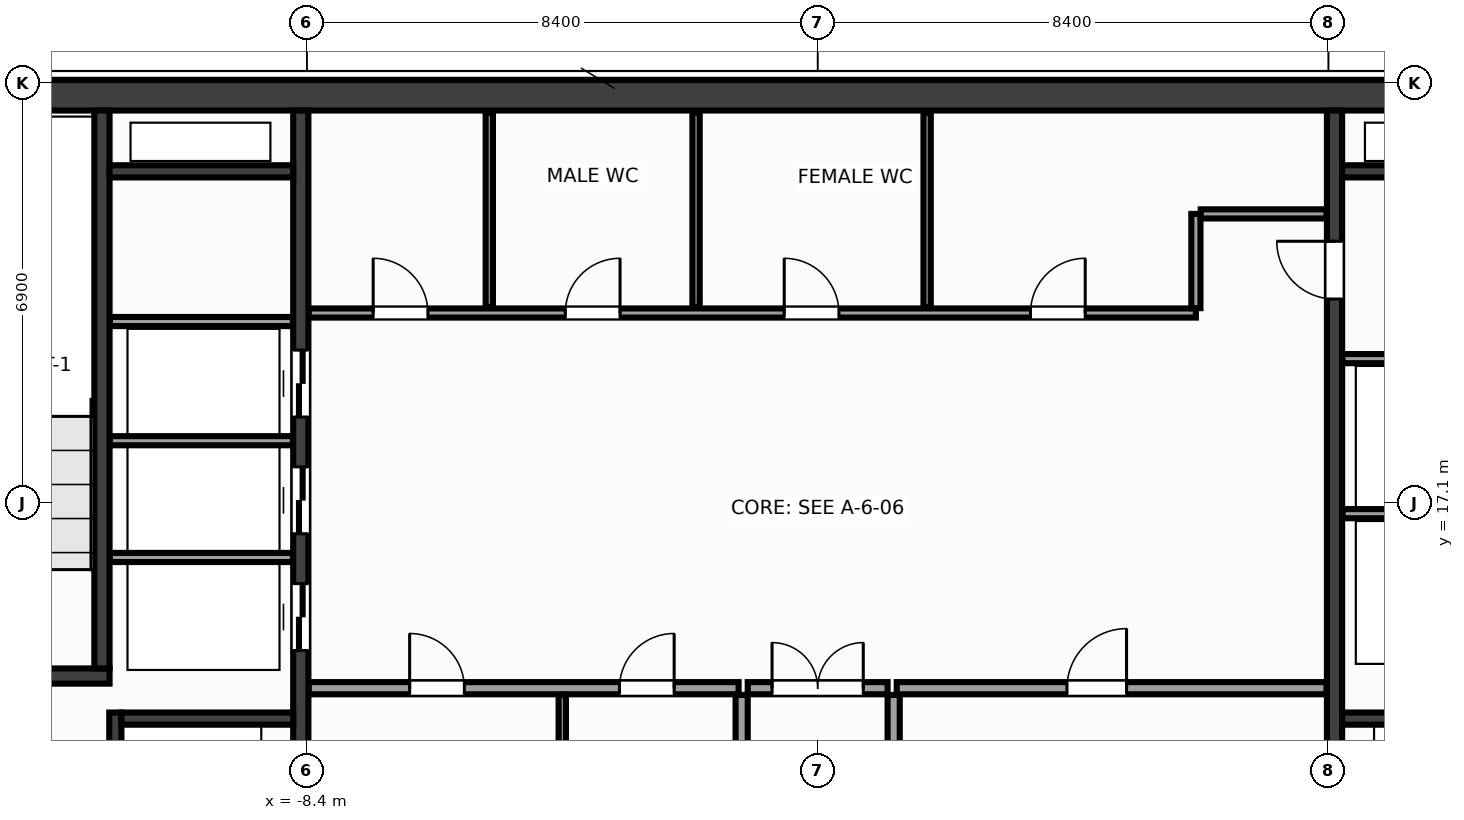
"""IFC4 building model, lengths in metres.
Left out: names, types, materials, properties, quantities, classifications, styles, units other than length and angle.
Written with IfcOpenShell. Run it as: python <this file> out.ifc"""

import sys

from ifc_helpers import new_model, si_unit, direction, frame, frame_2d, origin, place, context, subcontext, project, spatial, rectangle, extrude, source, transform, mapped, element, fill, save


model = new_model("IFC4")
c1 = context("Model", 3, precision=1e-05, world=origin(), true_north=direction((0.0, 1.0)))
c2 = subcontext(c1, "Body", "Model", "MODEL_VIEW")
j1 = project(units=[si_unit("LENGTHUNIT", "METRE"), si_unit("PLANEANGLEUNIT", "RADIAN")], contexts=[c1])
p1 = place(None, origin())
s1 = spatial("IfcSite", under=j1, at=p1, CompositionType="ELEMENT")
p2 = place(p1, origin())
s2 = spatial("IfcBuilding", under=s1, at=p2, CompositionType="ELEMENT")
p3 = place(p2, frame((0.0, 0.0, 272.0)))
s3 = spatial("IfcBuildingStorey", under=s2, at=p3, CompositionType="ELEMENT", Elevation=272.0)
m1 = source(origin(), c2, "Body", "SweptSolid", [
    extrude(rectangle(XDim=31.7, YDim=0.5, at=frame_2d((15.85, 0.0))), origin(), (0.0, 0.0, 1.0), 3.6),
])
p4 = place(p3, frame((-15.85, 23.8, 0.0), z_axis=(0.0, 0.0, 1.0), x_axis=(1.0, 0.0, 0.0)))
e1 = element("IfcWall", 1, at=p4, inside=s3, PredefinedType="SHEAR", context=c2, shape_type="MappedRepresentation", body=[
    mapped(m1, transform((0.0, 0.0, 0.0), x_axis=(1.0, 0.0, 0.0), y_axis=(0.0, 1.0, 0.0), z_axis=(0.0, 0.0, 1.0), scale=1.0)),
])
m2 = source(origin(), c2, "Body", "SweptSolid", [
    extrude(rectangle(XDim=13.1, YDim=0.25, at=frame_2d((6.55, 0.0))), origin(), (0.0, 0.0, 1.0), 3.6),
])
p5 = place(p3, frame((-8.5, 10.45, 0.0), z_axis=(0.0, 0.0, 1.0), x_axis=(0.0, 1.0, 0.0)))
e2 = element("IfcWall", 2, at=p5, inside=s3, PredefinedType="SHEAR", context=c2, shape_type="MappedRepresentation", body=[
    mapped(m2, transform((0.0, 0.0, 0.0), x_axis=(1.0, 0.0, 0.0), y_axis=(0.0, 1.0, 0.0), z_axis=(0.0, 0.0, 1.0), scale=1.0)),
])
p6 = place(p5, frame((4.22, 0.0, 0.0)))
e3 = element("IfcOpeningElement", 3, at=p6, cuts=e2, PredefinedType="OPENING", context=c2, shape_type="SweptSolid", body=[
    extrude(rectangle(XDim=1.1, YDim=2.15, at=frame_2d((0.55, 1.075))), frame((0.0, 0.137, 0.0), z_axis=(0.0, -1.0, 0.0), x_axis=(1.0, 0.0, 0.0)), (0.0, 0.0, 1.0), 0.274),
])
p7 = place(p5, frame((6.14, 0.0, 0.0)))
e4 = element("IfcOpeningElement", 4, at=p7, cuts=e2, PredefinedType="OPENING", context=c2, shape_type="SweptSolid", body=[
    extrude(rectangle(XDim=1.1, YDim=2.15, at=frame_2d((0.55, 1.075))), frame((0.0, 0.137, 0.0), z_axis=(0.0, -1.0, 0.0), x_axis=(1.0, 0.0, 0.0)), (0.0, 0.0, 1.0), 0.274),
])
p8 = place(p5, frame((8.06, 0.0, 0.0)))
e5 = element("IfcOpeningElement", 5, at=p8, cuts=e2, PredefinedType="OPENING", context=c2, shape_type="SweptSolid", body=[
    extrude(rectangle(XDim=1.1, YDim=2.15, at=frame_2d((0.55, 1.075))), frame((0.0, 0.137, 0.0), z_axis=(0.0, -1.0, 0.0), x_axis=(1.0, 0.0, 0.0)), (0.0, 0.0, 1.0), 0.274),
])
p9 = place(p3, frame((8.5, 10.45, 0.0), z_axis=(0.0, 0.0, 1.0), x_axis=(0.0, 1.0, 0.0)))
e6 = element("IfcWall", 6, at=p9, inside=s3, PredefinedType="SHEAR", context=c2, shape_type="MappedRepresentation", body=[
    mapped(m2, transform((0.0, 0.0, 0.0), x_axis=(1.0, 0.0, 0.0), y_axis=(0.0, 1.0, 0.0), z_axis=(0.0, 0.0, 1.0), scale=1.0)),
])
p10 = place(p9, frame((10.0, 0.0, 0.0)))
e7 = element("IfcOpeningElement", 7, at=p10, cuts=e6, PredefinedType="OPENING", context=c2, shape_type="SweptSolid", body=[
    extrude(rectangle(XDim=0.95, YDim=2.15, at=frame_2d((0.475, 1.075))), frame((0.0, 0.137, 0.0), z_axis=(0.0, -1.0, 0.0), x_axis=(1.0, 0.0, 0.0)), (0.0, 0.0, 1.0), 0.274),
])
m3 = source(origin(), c2, "Body", "SweptSolid", [
    extrude(rectangle(XDim=3.705, YDim=0.25, at=frame_2d((1.853, 0.0))), origin(), (0.0, 0.0, 1.0), 3.6),
])
p11 = place(p3, frame((-15.35, 14.25, 0.0), z_axis=(0.0, 0.0, 1.0), x_axis=(1.0, 0.0, 0.0)))
e8 = element("IfcWall", 8, at=p11, inside=s3, PredefinedType="SHEAR", context=c2, shape_type="MappedRepresentation", body=[
    mapped(m3, transform((0.0, 0.0, 0.0), x_axis=(1.0, 0.0, 0.0), y_axis=(0.0, 1.0, 0.0), z_axis=(0.0, 0.0, 1.0), scale=1.0)),
])
p12 = place(p11, frame((0.95, 0.0, 0.0)))
e9 = element("IfcOpeningElement", 9, at=p12, cuts=e8, PredefinedType="OPENING", context=c2, shape_type="SweptSolid", body=[
    extrude(rectangle(XDim=1.6, YDim=2.15, at=frame_2d((0.8, 1.075))), frame((0.0, 0.137, 0.0), z_axis=(0.0, -1.0, 0.0), x_axis=(1.0, 0.0, 0.0)), (0.0, 0.0, 1.0), 0.274),
])
m4 = source(origin(), c2, "Body", "SweptSolid", [
    extrude(rectangle(XDim=9.175, YDim=0.25, at=frame_2d((4.587, 0.0))), origin(), (0.0, 0.0, 1.0), 3.6),
])
p13 = place(p3, frame((-11.77, 14.375, 0.0), z_axis=(0.0, 0.0, 1.0), x_axis=(0.0, 1.0, 0.0)))
e10 = element("IfcWall", 10, at=p13, inside=s3, PredefinedType="SHEAR", context=c2, shape_type="MappedRepresentation", body=[
    mapped(m4, transform((0.0, 0.0, 0.0), x_axis=(1.0, 0.0, 0.0), y_axis=(0.0, 1.0, 0.0), z_axis=(0.0, 0.0, 1.0), scale=1.0)),
])
m5 = source(origin(), c2, "Body", "SweptSolid", [
    extrude(rectangle(XDim=3.2, YDim=0.2, at=frame_2d((1.6, 0.0))), origin(), (0.0, 0.0, 1.0), 3.6),
])
p14 = place(p3, frame((-11.55, 10.45, 0.0), z_axis=(0.0, 0.0, 1.0), x_axis=(0.0, 1.0, 0.0)))
e11 = element("IfcWall", 11, at=p14, inside=s3, PredefinedType="SHEAR", context=c2, shape_type="MappedRepresentation", body=[
    mapped(m5, transform((0.0, 0.0, 0.0), x_axis=(1.0, 0.0, 0.0), y_axis=(0.0, 1.0, 0.0), z_axis=(0.0, 0.0, 1.0), scale=1.0)),
])
p15 = place(p14, frame((0.9, 0.0, 0.0)))
e12 = element("IfcOpeningElement", 12, at=p15, cuts=e11, PredefinedType="OPENING", context=c2, shape_type="SweptSolid", body=[
    extrude(rectangle(XDim=1.1, YDim=2.15, at=frame_2d((0.55, 1.075))), frame((0.0, 0.112, 0.0), z_axis=(0.0, -1.0, 0.0), x_axis=(1.0, 0.0, 0.0)), (0.0, 0.0, 1.0), 0.224),
])
m6 = source(origin(), c2, "Body", "SweptSolid", [
    extrude(rectangle(XDim=2.825, YDim=0.2, at=frame_2d((1.413, 0.0))), origin(), (0.0, 0.0, 1.0), 3.6),
])
for number, where, z_axis, x_axis in (
    (13, (-11.45, 13.55, 0.0), (0.0, 0.0, 1.0), (1.0, 0.0, 0.0)),
    (14, (8.625, 13.55, 0.0), (0.0, 0.0, 1.0), (1.0, 0.0, 0.0)),
):
    element("IfcWall", number, at=place(p3, frame(where, z_axis=z_axis, x_axis=x_axis)), inside=s3, PredefinedType="SHEAR", context=c2, shape_type="MappedRepresentation", body=[
        mapped(m6, transform((0.0, 0.0, 0.0), x_axis=(1.0, 0.0, 0.0), y_axis=(0.0, 1.0, 0.0), z_axis=(0.0, 0.0, 1.0), scale=1.0)),
    ])
m7 = source(origin(), c2, "Body", "SweptSolid", [
    extrude(rectangle(XDim=3.02, YDim=0.2, at=frame_2d((1.51, 0.0))), origin(), (0.0, 0.0, 1.0), 3.6),
])
for number, where, z_axis, x_axis in (
    (15, (-11.645, 22.55, 0.0), (0.0, 0.0, 1.0), (1.0, 0.0, 0.0)),
    (16, (8.625, 22.55, 0.0), (0.0, 0.0, 1.0), (1.0, 0.0, 0.0)),
):
    element("IfcWall", number, at=place(p3, frame(where, z_axis=z_axis, x_axis=x_axis)), inside=s3, PredefinedType="SHEAR", context=c2, shape_type="MappedRepresentation", body=[
        mapped(m7, transform((0.0, 0.0, 0.0), x_axis=(1.0, 0.0, 0.0), y_axis=(0.0, 1.0, 0.0), z_axis=(0.0, 0.0, 1.0), scale=1.0)),
    ])
m8 = source(origin(), c2, "Body", "SweptSolid", [
    extrude(rectangle(XDim=3.01, YDim=0.15, at=frame_2d((1.505, 0.0))), origin(), (0.0, 0.0, 1.0), 3.37),
])
for number, where, z_axis, x_axis in (
    (17, (-11.64, 16.2, 0.0), (0.0, 0.0, 1.0), (1.0, 0.0, 0.0)),
    (18, (-11.64, 18.12, 0.0), (0.0, 0.0, 1.0), (1.0, 0.0, 0.0)),
    (19, (-11.64, 20.08, 0.0), (0.0, 0.0, 1.0), (1.0, 0.0, 0.0)),
    (20, (8.63, 16.92, 0.0), (0.0, 0.0, 1.0), (1.0, 0.0, 0.0)),
    (21, (8.63, 19.47, 0.0), (0.0, 0.0, 1.0), (1.0, 0.0, 0.0)),
):
    element("IfcWall", number, at=place(p3, frame(where, z_axis=z_axis, x_axis=x_axis)), inside=s3, PredefinedType="PARTITIONING", context=c2, shape_type="MappedRepresentation", body=[
        mapped(m8, transform((0.0, 0.0, 0.0), x_axis=(1.0, 0.0, 0.0), y_axis=(0.0, 1.0, 0.0), z_axis=(0.0, 0.0, 1.0), scale=1.0)),
    ])
m9 = source(origin(), c2, "Body", "SweptSolid", [
    extrude(rectangle(XDim=7.07, YDim=0.2, at=frame_2d((3.535, 0.0))), origin(), (0.0, 0.0, 1.0), 3.37),
])
p16 = place(p3, frame((-8.37, 14.05, 0.0), z_axis=(0.0, 0.0, 1.0), x_axis=(1.0, 0.0, 0.0)))
e22 = element("IfcWall", 22, at=p16, inside=s3, PredefinedType="PARTITIONING", context=c2, shape_type="MappedRepresentation", body=[
    mapped(m9, transform((0.0, 0.0, 0.0), x_axis=(1.0, 0.0, 0.0), y_axis=(0.0, 1.0, 0.0), z_axis=(0.0, 0.0, 1.0), scale=1.0)),
])
p17 = place(p16, frame((1.66, 0.0, 0.0)))
e23 = element("IfcOpeningElement", 23, at=p17, cuts=e22, PredefinedType="OPENING", context=c2, shape_type="SweptSolid", body=[
    extrude(rectangle(XDim=0.9, YDim=2.15, at=frame_2d((0.45, 1.075))), frame((0.0, 0.112, 0.0), z_axis=(0.0, -1.0, 0.0), x_axis=(1.0, 0.0, 0.0)), (0.0, 0.0, 1.0), 0.224),
])
p18 = place(p16, frame((5.11, 0.0, 0.0)))
e24 = element("IfcOpeningElement", 24, at=p18, cuts=e22, PredefinedType="OPENING", context=c2, shape_type="SweptSolid", body=[
    extrude(rectangle(XDim=0.9, YDim=2.15, at=frame_2d((0.45, 1.075))), frame((0.0, 0.112, 0.0), z_axis=(0.0, -1.0, 0.0), x_axis=(1.0, 0.0, 0.0)), (0.0, 0.0, 1.0), 0.224),
])
p19 = place(p3, frame((1.3, 14.05, 0.0), z_axis=(0.0, 0.0, 1.0), x_axis=(1.0, 0.0, 0.0)))
e25 = element("IfcWall", 25, at=p19, inside=s3, PredefinedType="PARTITIONING", context=c2, shape_type="MappedRepresentation", body=[
    mapped(m9, transform((0.0, 0.0, 0.0), x_axis=(1.0, 0.0, 0.0), y_axis=(0.0, 1.0, 0.0), z_axis=(0.0, 0.0, 1.0), scale=1.0)),
])
p20 = place(p19, frame((2.8, 0.0, 0.0)))
e26 = element("IfcOpeningElement", 26, at=p20, cuts=e25, PredefinedType="OPENING", context=c2, shape_type="SweptSolid", body=[
    extrude(rectangle(XDim=0.98, YDim=2.15, at=frame_2d((0.49, 1.075))), frame((0.0, 0.112, 0.0), z_axis=(0.0, -1.0, 0.0), x_axis=(1.0, 0.0, 0.0)), (0.0, 0.0, 1.0), 0.224),
])
m10 = source(origin(), c2, "Body", "SweptSolid", [
    extrude(rectangle(XDim=3.49, YDim=0.2, at=frame_2d((1.745, 0.0))), origin(), (0.0, 0.0, 1.0), 3.37),
])
for number, where, z_axis, x_axis in (
    (27, (-1.25, 10.45, 0.0), (0.0, 0.0, 1.0), (0.0, 1.0, 0.0)),
    (28, (1.25, 10.45, 0.0), (0.0, 0.0, 1.0), (0.0, 1.0, 0.0)),
):
    element("IfcWall", number, at=place(p3, frame(where, z_axis=z_axis, x_axis=x_axis)), inside=s3, PredefinedType="PARTITIONING", context=c2, shape_type="MappedRepresentation", body=[
        mapped(m10, transform((0.0, 0.0, 0.0), x_axis=(1.0, 0.0, 0.0), y_axis=(0.0, 1.0, 0.0), z_axis=(0.0, 0.0, 1.0), scale=1.0)),
    ])
m11 = source(origin(), c2, "Body", "SweptSolid", [
    extrude(rectangle(XDim=2.3, YDim=0.2, at=frame_2d((1.15, 0.0))), origin(), (0.0, 0.0, 1.0), 3.37),
])
p21 = place(p3, frame((-1.15, 14.05, 0.0), z_axis=(0.0, 0.0, 1.0), x_axis=(1.0, 0.0, 0.0)))
e29 = element("IfcWall", 29, at=p21, inside=s3, PredefinedType="PARTITIONING", context=c2, shape_type="MappedRepresentation", body=[
    mapped(m11, transform((0.0, 0.0, 0.0), x_axis=(1.0, 0.0, 0.0), y_axis=(0.0, 1.0, 0.0), z_axis=(0.0, 0.0, 1.0), scale=1.0)),
])
p22 = place(p21, frame((0.4, 0.0, 0.0)))
e30 = element("IfcOpeningElement", 30, at=p22, cuts=e29, PredefinedType="OPENING", context=c2, shape_type="SweptSolid", body=[
    extrude(rectangle(XDim=1.5, YDim=2.2, at=frame_2d((0.75, 1.1))), frame((0.0, 0.112, 0.0), z_axis=(0.0, -1.0, 0.0), x_axis=(1.0, 0.0, 0.0)), (0.0, 0.0, 1.0), 0.224),
])
m12 = source(origin(), c2, "Body", "SweptSolid", [
    extrude(rectangle(XDim=14.59, YDim=0.15, at=frame_2d((7.295, 0.0))), origin(), (0.0, 0.0, 1.0), 3.37),
])
p23 = place(p3, frame((-8.37, 20.22, 0.0), z_axis=(0.0, 0.0, 1.0), x_axis=(1.0, 0.0, 0.0)))
e31 = element("IfcWall", 31, at=p23, inside=s3, PredefinedType="PARTITIONING", context=c2, shape_type="MappedRepresentation", body=[
    mapped(m12, transform((0.0, 0.0, 0.0), x_axis=(1.0, 0.0, 0.0), y_axis=(0.0, 1.0, 0.0), z_axis=(0.0, 0.0, 1.0), scale=1.0)),
])
p24 = place(p23, frame((1.06, 0.0, 0.0)))
e32 = element("IfcOpeningElement", 32, at=p24, cuts=e31, PredefinedType="OPENING", context=c2, shape_type="SweptSolid", body=[
    extrude(rectangle(XDim=0.9, YDim=2.15, at=frame_2d((0.45, 1.075))), frame((0.0, 0.087, 0.0), z_axis=(0.0, -1.0, 0.0), x_axis=(1.0, 0.0, 0.0)), (0.0, 0.0, 1.0), 0.174),
])
p25 = place(p23, frame((4.22, 0.0, 0.0)))
e33 = element("IfcOpeningElement", 33, at=p25, cuts=e31, PredefinedType="OPENING", context=c2, shape_type="SweptSolid", body=[
    extrude(rectangle(XDim=0.9, YDim=2.15, at=frame_2d((0.45, 1.075))), frame((0.0, 0.087, 0.0), z_axis=(0.0, -1.0, 0.0), x_axis=(1.0, 0.0, 0.0)), (0.0, 0.0, 1.0), 0.174),
])
p26 = place(p23, frame((7.82, 0.0, 0.0)))
e34 = element("IfcOpeningElement", 34, at=p26, cuts=e31, PredefinedType="OPENING", context=c2, shape_type="SweptSolid", body=[
    extrude(rectangle(XDim=0.9, YDim=2.15, at=frame_2d((0.45, 1.075))), frame((0.0, 0.087, 0.0), z_axis=(0.0, -1.0, 0.0), x_axis=(1.0, 0.0, 0.0)), (0.0, 0.0, 1.0), 0.174),
])
p27 = place(p23, frame((11.87, 0.0, 0.0)))
e35 = element("IfcOpeningElement", 35, at=p27, cuts=e31, PredefinedType="OPENING", context=c2, shape_type="SweptSolid", body=[
    extrude(rectangle(XDim=0.9, YDim=2.15, at=frame_2d((0.45, 1.075))), frame((0.0, 0.087, 0.0), z_axis=(0.0, -1.0, 0.0), x_axis=(1.0, 0.0, 0.0)), (0.0, 0.0, 1.0), 0.174),
])
m13 = source(origin(), c2, "Body", "SweptSolid", [
    extrude(rectangle(XDim=1.55, YDim=0.15, at=frame_2d((0.775, 0.0))), origin(), (0.0, 0.0, 1.0), 3.37),
])
p28 = place(p3, frame((6.22, 20.3, 0.0), z_axis=(0.0, 0.0, 1.0), x_axis=(0.0, 1.0, 0.0)))
e36 = element("IfcWall", 36, at=p28, inside=s3, PredefinedType="PARTITIONING", context=c2, shape_type="MappedRepresentation", body=[
    mapped(m13, transform((0.0, 0.0, 0.0), x_axis=(1.0, 0.0, 0.0), y_axis=(0.0, 1.0, 0.0), z_axis=(0.0, 0.0, 1.0), scale=1.0)),
])
m14 = source(origin(), c2, "Body", "SweptSolid", [
    extrude(rectangle(XDim=2.07, YDim=0.15, at=frame_2d((1.035, 0.0))), origin(), (0.0, 0.0, 1.0), 3.37),
])
p29 = place(p3, frame((6.3, 21.85, 0.0), z_axis=(0.0, 0.0, 1.0), x_axis=(1.0, 0.0, 0.0)))
e37 = element("IfcWall", 37, at=p29, inside=s3, PredefinedType="PARTITIONING", context=c2, shape_type="MappedRepresentation", body=[
    mapped(m14, transform((0.0, 0.0, 0.0), x_axis=(1.0, 0.0, 0.0), y_axis=(0.0, 1.0, 0.0), z_axis=(0.0, 0.0, 1.0), scale=1.0)),
])
m15 = source(origin(), c2, "Body", "SweptSolid", [
    extrude(rectangle(XDim=3.49, YDim=0.12, at=frame_2d((1.745, 0.0))), origin(), (0.0, 0.0, 1.0), 3.37),
])
p30 = place(p3, frame((-4.2, 10.45, 0.0), z_axis=(0.0, 0.0, 1.0), x_axis=(0.0, 1.0, 0.0)))
e38 = element("IfcWall", 38, at=p30, inside=s3, PredefinedType="PARTITIONING", context=c2, shape_type="MappedRepresentation", body=[
    mapped(m15, transform((0.0, 0.0, 0.0), x_axis=(1.0, 0.0, 0.0), y_axis=(0.0, 1.0, 0.0), z_axis=(0.0, 0.0, 1.0), scale=1.0)),
])
m16 = source(origin(), c2, "Body", "SweptSolid", [
    extrude(rectangle(XDim=3.19, YDim=0.12, at=frame_2d((1.595, 0.0))), origin(), (0.0, 0.0, 1.0), 3.37),
])
for number, where, z_axis, x_axis in (
    (39, (-5.4, 20.32, 0.0), (0.0, 0.0, 1.0), (0.0, 1.0, 0.0)),
    (40, (-2.0, 20.32, 0.0), (0.0, 0.0, 1.0), (0.0, 1.0, 0.0)),
    (41, (1.8, 20.32, 0.0), (0.0, 0.0, 1.0), (0.0, 1.0, 0.0)),
):
    element("IfcWall", number, at=place(p3, frame(where, z_axis=z_axis, x_axis=x_axis)), inside=s3, PredefinedType="PARTITIONING", context=c2, shape_type="MappedRepresentation", body=[
        mapped(m16, transform((0.0, 0.0, 0.0), x_axis=(1.0, 0.0, 0.0), y_axis=(0.0, 1.0, 0.0), z_axis=(0.0, 0.0, 1.0), scale=1.0)),
    ])
m17 = source(origin(), c2, "Body", "SweptSolid", [
    extrude(rectangle(XDim=1.1, YDim=2.15, at=frame_2d((0.55, 1.075))), frame((0.0, 0.025, 0.0), z_axis=(0.0, -1.0, 0.0), x_axis=(1.0, 0.0, 0.0)), (0.0, 0.0, 1.0), 0.05),
])
p31 = place(p6, origin())
e42 = element("IfcDoor", 42, at=p31, inside=s3, OperationType="DOUBLE_DOOR_SLIDING", PredefinedType="DOOR", context=c2, shape_type="MappedRepresentation", body=[
    mapped(m17, transform((0.0, 0.0, 0.0), x_axis=(1.0, 0.0, 0.0), y_axis=(0.0, 1.0, 0.0), z_axis=(0.0, 0.0, 1.0), scale=1.0)),
])
fill(e3, e42)
p32 = place(p7, origin())
e43 = element("IfcDoor", 43, at=p32, inside=s3, OperationType="DOUBLE_DOOR_SLIDING", PredefinedType="DOOR", context=c2, shape_type="MappedRepresentation", body=[
    mapped(m17, transform((0.0, 0.0, 0.0), x_axis=(1.0, 0.0, 0.0), y_axis=(0.0, 1.0, 0.0), z_axis=(0.0, 0.0, 1.0), scale=1.0)),
])
fill(e4, e43)
p33 = place(p8, origin())
e44 = element("IfcDoor", 44, at=p33, inside=s3, OperationType="DOUBLE_DOOR_SLIDING", PredefinedType="DOOR", context=c2, shape_type="MappedRepresentation", body=[
    mapped(m17, transform((0.0, 0.0, 0.0), x_axis=(1.0, 0.0, 0.0), y_axis=(0.0, 1.0, 0.0), z_axis=(0.0, 0.0, 1.0), scale=1.0)),
])
fill(e5, e44)
m18 = source(origin(), c2, "Body", "SweptSolid", [
    extrude(rectangle(XDim=0.95, YDim=2.15, at=frame_2d((0.475, 1.075))), frame((0.0, 0.025, 0.0), z_axis=(0.0, -1.0, 0.0), x_axis=(1.0, 0.0, 0.0)), (0.0, 0.0, 1.0), 0.05),
])
p34 = place(p10, origin())
e45 = element("IfcDoor", 45, at=p34, inside=s3, OperationType="SINGLE_SWING_RIGHT", PredefinedType="DOOR", context=c2, shape_type="MappedRepresentation", body=[
    mapped(m18, transform((0.0, 0.0, 0.0), x_axis=(1.0, 0.0, 0.0), y_axis=(0.0, 1.0, 0.0), z_axis=(0.0, 0.0, 1.0), scale=1.0)),
])
fill(e7, e45)
m19 = source(origin(), c2, "Body", "SweptSolid", [
    extrude(rectangle(XDim=0.9, YDim=2.15, at=frame_2d((0.45, 1.075))), frame((0.0, 0.025, 0.0), z_axis=(0.0, -1.0, 0.0), x_axis=(1.0, 0.0, 0.0)), (0.0, 0.0, 1.0), 0.05),
])
p35 = place(p17, origin())
e46 = element("IfcDoor", 46, at=p35, inside=s3, OperationType="SINGLE_SWING_LEFT", PredefinedType="DOOR", context=c2, shape_type="MappedRepresentation", body=[
    mapped(m19, transform((0.0, 0.0, 0.0), x_axis=(1.0, 0.0, 0.0), y_axis=(0.0, 1.0, 0.0), z_axis=(0.0, 0.0, 1.0), scale=1.0)),
])
fill(e23, e46)
p36 = place(p18, origin())
e47 = element("IfcDoor", 47, at=p36, inside=s3, OperationType="SINGLE_SWING_RIGHT", PredefinedType="DOOR", context=c2, shape_type="MappedRepresentation", body=[
    mapped(m19, transform((0.0, 0.0, 0.0), x_axis=(1.0, 0.0, 0.0), y_axis=(0.0, 1.0, 0.0), z_axis=(0.0, 0.0, 1.0), scale=1.0)),
])
fill(e24, e47)
m20 = source(origin(), c2, "Body", "SweptSolid", [
    extrude(rectangle(XDim=0.98, YDim=2.15, at=frame_2d((0.49, 1.075))), frame((0.0, 0.025, 0.0), z_axis=(0.0, -1.0, 0.0), x_axis=(1.0, 0.0, 0.0)), (0.0, 0.0, 1.0), 0.05),
])
p37 = place(p20, origin())
e48 = element("IfcDoor", 48, at=p37, inside=s3, OperationType="SINGLE_SWING_RIGHT", PredefinedType="DOOR", context=c2, shape_type="MappedRepresentation", body=[
    mapped(m20, transform((0.0, 0.0, 0.0), x_axis=(1.0, 0.0, 0.0), y_axis=(0.0, 1.0, 0.0), z_axis=(0.0, 0.0, 1.0), scale=1.0)),
])
fill(e26, e48)
m21 = source(origin(), c2, "Body", "SweptSolid", [
    extrude(rectangle(XDim=1.5, YDim=2.2, at=frame_2d((0.75, 1.1))), frame((0.0, 0.025, 0.0), z_axis=(0.0, -1.0, 0.0), x_axis=(1.0, 0.0, 0.0)), (0.0, 0.0, 1.0), 0.05),
])
p38 = place(p22, origin())
e49 = element("IfcDoor", 49, at=p38, inside=s3, OperationType="DOUBLE_DOOR_SINGLE_SWING", PredefinedType="DOOR", context=c2, shape_type="MappedRepresentation", body=[
    mapped(m21, transform((0.0, 0.0, 0.0), x_axis=(1.0, 0.0, 0.0), y_axis=(0.0, 1.0, 0.0), z_axis=(0.0, 0.0, 1.0), scale=1.0)),
])
fill(e30, e49)
p39 = place(p24, origin())
e50 = element("IfcDoor", 50, at=p39, inside=s3, OperationType="SINGLE_SWING_LEFT", PredefinedType="DOOR", context=c2, shape_type="MappedRepresentation", body=[
    mapped(m19, transform((0.0, 0.0, 0.0), x_axis=(1.0, 0.0, 0.0), y_axis=(0.0, 1.0, 0.0), z_axis=(0.0, 0.0, 1.0), scale=1.0)),
])
fill(e32, e50)
p40 = place(p25, origin())
e51 = element("IfcDoor", 51, at=p40, inside=s3, OperationType="SINGLE_SWING_RIGHT", PredefinedType="DOOR", context=c2, shape_type="MappedRepresentation", body=[
    mapped(m19, transform((0.0, 0.0, 0.0), x_axis=(1.0, 0.0, 0.0), y_axis=(0.0, 1.0, 0.0), z_axis=(0.0, 0.0, 1.0), scale=1.0)),
])
fill(e33, e51)
p41 = place(p26, origin())
e52 = element("IfcDoor", 52, at=p41, inside=s3, OperationType="SINGLE_SWING_LEFT", PredefinedType="DOOR", context=c2, shape_type="MappedRepresentation", body=[
    mapped(m19, transform((0.0, 0.0, 0.0), x_axis=(1.0, 0.0, 0.0), y_axis=(0.0, 1.0, 0.0), z_axis=(0.0, 0.0, 1.0), scale=1.0)),
])
fill(e34, e52)
p42 = place(p27, origin())
e53 = element("IfcDoor", 53, at=p42, inside=s3, OperationType="SINGLE_SWING_RIGHT", PredefinedType="DOOR", context=c2, shape_type="MappedRepresentation", body=[
    mapped(m19, transform((0.0, 0.0, 0.0), x_axis=(1.0, 0.0, 0.0), y_axis=(0.0, 1.0, 0.0), z_axis=(0.0, 0.0, 1.0), scale=1.0)),
])
fill(e35, e53)
save(model, sys.argv[1])
